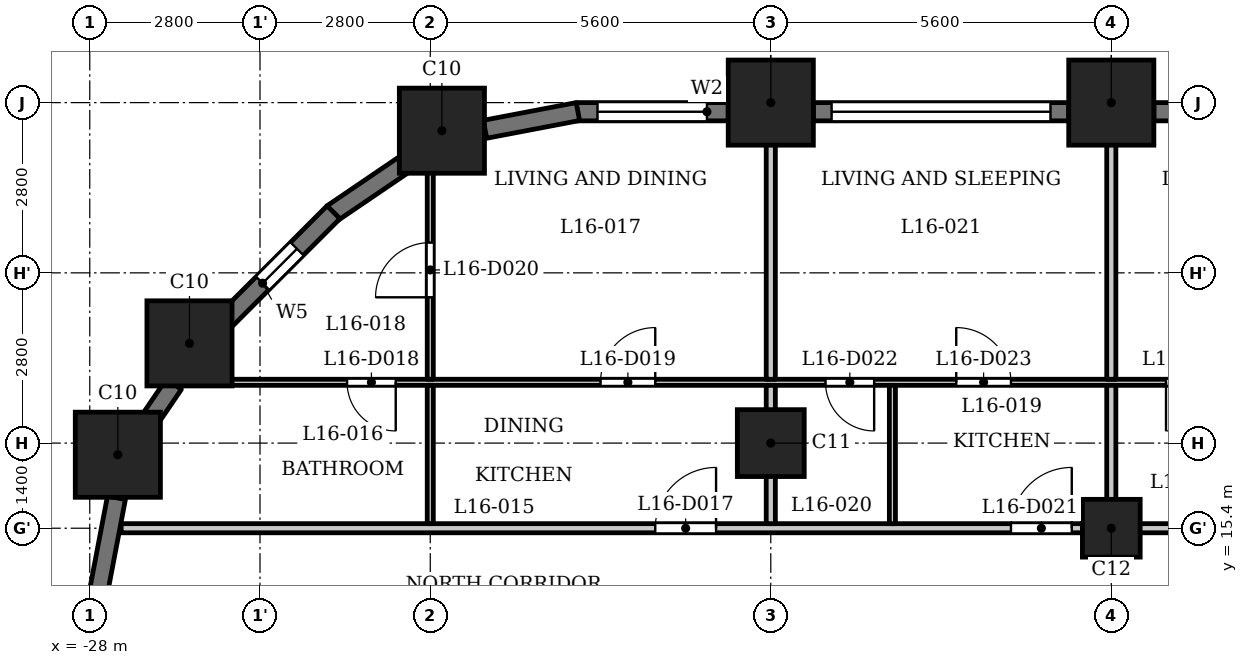
"""IFC4 building model, lengths in metres.
Left out: names, types, materials, properties, quantities, classifications, styles, units other than length and angle.
Written with IfcOpenShell. Run it as: python <this file> out.ifc"""

import sys

from ifc_helpers import new_model, si_unit, direction, frame, frame_2d, origin, origin_2d, place, context, subcontext, project, spatial, rectangle, extrude, element, fill, save


model = new_model("IFC4")
c1 = context("Model", 3, precision=1e-05, world=origin(), true_north=direction((0.0, 1.0)))
c2 = subcontext(c1, "Body", "Model", "MODEL_VIEW")
j1 = project(units=[si_unit("LENGTHUNIT", "METRE"), si_unit("PLANEANGLEUNIT", "RADIAN")], contexts=[c1])
p1 = place(None, origin())
s1 = spatial("IfcSite", under=j1, at=p1, CompositionType="ELEMENT")
p2 = place(p1, origin())
s2 = spatial("IfcBuilding", under=s1, at=p2, CompositionType="ELEMENT")
p3 = place(p2, frame((0.0, 0.0, 65.5)))
s3 = spatial("IfcBuildingStorey", under=s2, at=p3, CompositionType="ELEMENT", Elevation=65.5)
for number, where, z_axis, x_axis in (
    (1, (-11.2, 22.4, 0.0), (0.0, 0.0, 1.0), (1.0, 0.0, 0.0)),
    (2, (-16.8, 22.4, 0.0), (0.0, 0.0, 1.0), (1.0, 0.0, 0.0)),
    (3, (-22.209, 21.938, 0.0), (0.0, 0.0, 1.0), (1.0, 0.0, 0.0)),
    (4, (-26.36, 18.44, 0.0), (0.0, 0.0, 1.0), (1.0, 0.0, 0.0)),
    (5, (-27.538, 16.609, 0.0), (0.0, 0.0, 1.0), (1.0, 0.0, 0.0)),
):
    element("IfcColumn", number, at=place(p3, frame(where, z_axis=z_axis, x_axis=x_axis)), inside=s3, PredefinedType="COLUMN", context=c2, shape_type="SweptSolid", body=[
        extrude(rectangle(XDim=1.4, YDim=1.4, at=origin_2d()), origin(), (0.0, 0.0, 1.0), 3.5),
    ])
p4 = place(p3, frame((-16.8, 16.8, 0.0), z_axis=(0.0, 0.0, 1.0), x_axis=(1.0, 0.0, 0.0)))
e6 = element("IfcColumn", 6, at=p4, inside=s3, PredefinedType="COLUMN", context=c2, shape_type="SweptSolid", body=[
    extrude(rectangle(XDim=1.1, YDim=1.1, at=origin_2d()), origin(), (0.0, 0.0, 1.0), 3.5),
])
p5 = place(p3, frame((-11.2, 15.4, 0.0), z_axis=(0.0, 0.0, 1.0), x_axis=(1.0, 0.0, 0.0)))
e7 = element("IfcColumn", 7, at=p5, inside=s3, PredefinedType="COLUMN", context=c2, shape_type="SweptSolid", body=[
    extrude(rectangle(XDim=0.95, YDim=0.95, at=origin_2d()), origin(), (0.0, 0.0, 1.0), 3.5),
])
p6 = place(p3, frame((-6.3, 22.25, 0.0), z_axis=(0.0, 0.0, 1.0), x_axis=(-1.0, 0.0, 0.0)))
e8 = element("IfcWall", 8, at=p6, inside=s3, PredefinedType="SOLIDWALL", context=c2, shape_type="SweptSolid", body=[
    extrude(rectangle(XDim=4.2, YDim=0.3, at=frame_2d((2.1, 0.0))), origin(), (0.0, 0.0, 1.0), 2.35),
])
p7 = place(p6, frame((0.3, 0.0, 1.2)))
e9 = element("IfcOpeningElement", 9, at=p7, cuts=e8, PredefinedType="OPENING", context=c2, shape_type="SweptSolid", body=[
    extrude(rectangle(XDim=3.6, YDim=0.95, at=frame_2d((1.8, 0.475))), frame((0.0, 0.16, 0.0), z_axis=(0.0, -1.0, 0.0), x_axis=(1.0, 0.0, 0.0)), (0.0, 0.0, 1.0), 0.32),
])
p8 = place(p3, frame((-11.9, 22.25, 0.0), z_axis=(0.0, 0.0, 1.0), x_axis=(-1.0, 0.0, 0.0)))
e10 = element("IfcWall", 10, at=p8, inside=s3, PredefinedType="SOLIDWALL", context=c2, shape_type="SweptSolid", body=[
    extrude(rectangle(XDim=4.2, YDim=0.3, at=frame_2d((2.1, 0.0))), origin(), (0.0, 0.0, 1.0), 2.35),
])
p9 = place(p8, frame((0.3, 0.0, 1.2)))
e11 = element("IfcOpeningElement", 11, at=p9, cuts=e10, PredefinedType="OPENING", context=c2, shape_type="SweptSolid", body=[
    extrude(rectangle(XDim=3.6, YDim=0.95, at=frame_2d((1.8, 0.475))), frame((0.0, 0.16, 0.0), z_axis=(0.0, -1.0, 0.0), x_axis=(1.0, 0.0, 0.0)), (0.0, 0.0, 1.0), 0.32),
])
p10 = place(p3, frame((-17.5, 22.25, 0.0), z_axis=(0.0, 0.0, 1.0), x_axis=(-1.0, 0.0, 0.0)))
e12 = element("IfcWall", 12, at=p10, inside=s3, PredefinedType="SOLIDWALL", context=c2, shape_type="SweptSolid", body=[
    extrude(rectangle(XDim=2.5, YDim=0.3, at=frame_2d((1.25, 0.0))), origin(), (0.0, 0.0, 1.0), 2.35),
])
p11 = place(p10, frame((0.35, 0.0, 0.9)))
e13 = element("IfcOpeningElement", 13, at=p11, cuts=e12, PredefinedType="OPENING", context=c2, shape_type="SweptSolid", body=[
    extrude(rectangle(XDim=1.8, YDim=1.25, at=frame_2d((0.9, 0.625))), frame((0.0, 0.16, 0.0), z_axis=(0.0, -1.0, 0.0), x_axis=(1.0, 0.0, 0.0)), (0.0, 0.0, 1.0), 0.32),
])
p12 = place(p3, frame((-19.972, 22.253, 0.0), z_axis=(0.0, 0.0, 1.0), x_axis=(-0.982297345734, -0.187328386968, 0.0)))
e14 = element("IfcWall", 14, at=p12, inside=s3, PredefinedType="SOLIDWALL", context=c2, shape_type="SweptSolid", body=[
    extrude(rectangle(XDim=1.556, YDim=0.3, at=frame_2d((0.778, 0.0))), origin(), (0.0, 0.0, 1.0), 2.35),
])
p13 = place(p3, frame((-22.726, 21.454, 0.0), z_axis=(0.0, 0.0, 1.0), x_axis=(-0.827019875346, -0.562172683241, 0.0)))
e15 = element("IfcWall", 15, at=p13, inside=s3, PredefinedType="SOLIDWALL", context=c2, shape_type="SweptSolid", body=[
    extrude(rectangle(XDim=1.556, YDim=0.3, at=frame_2d((0.778, 0.0))), origin(), (0.0, 0.0, 1.0), 2.35),
])
p14 = place(p3, frame((-23.991, 20.597, 0.0), z_axis=(0.0, 0.0, 1.0), x_axis=(-0.707106781187, -0.707106781187, 0.0)))
e16 = element("IfcWall", 16, at=p14, inside=s3, PredefinedType="SOLIDWALL", context=c2, shape_type="SweptSolid", body=[
    extrude(rectangle(XDim=2.5, YDim=0.3, at=frame_2d((1.25, 0.0))), origin(), (0.0, 0.0, 1.0), 2.35),
])
p15 = place(p14, frame((0.85, 0.0, 0.6)))
e17 = element("IfcOpeningElement", 17, at=p15, cuts=e16, PredefinedType="OPENING", context=c2, shape_type="SweptSolid", body=[
    extrude(rectangle(XDim=0.8, YDim=1.55, at=frame_2d((0.4, 0.775))), frame((0.0, 0.16, 0.0), z_axis=(0.0, -1.0, 0.0), x_axis=(1.0, 0.0, 0.0)), (0.0, 0.0, 1.0), 0.32),
])
p16 = place(p3, frame((-26.617, 17.769, 0.0), z_axis=(0.0, 0.0, 1.0), x_axis=(-0.562000651531, -0.827136788977, 0.0)))
e18 = element("IfcWall", 18, at=p16, inside=s3, PredefinedType="SOLIDWALL", context=c2, shape_type="SweptSolid", body=[
    extrude(rectangle(XDim=0.777, YDim=0.3, at=frame_2d((0.389, 0.0))), origin(), (0.0, 0.0, 1.0), 3.2),
])
p17 = place(p3, frame((-27.561, 15.9, 0.0), z_axis=(0.0, 0.0, 1.0), x_axis=(-0.187328386968, -0.982297345734, 0.0)))
e19 = element("IfcWall", 19, at=p17, inside=s3, PredefinedType="SOLIDWALL", context=c2, shape_type="SweptSolid", body=[
    extrude(rectangle(XDim=1.556, YDim=0.3, at=frame_2d((0.778, 0.0))), origin(), (0.0, 0.0, 1.0), 2.35),
])
p18 = place(p3, frame((-27.484, 15.4, 0.0), z_axis=(0.0, 0.0, 1.0), x_axis=(1.0, 0.0, 0.0)))
e20 = element("IfcWall", 20, at=p18, inside=s3, PredefinedType="PARTITIONING", context=c2, shape_type="SweptSolid", body=[
    extrude(rectangle(XDim=54.968, YDim=0.15, at=frame_2d((27.484, 0.0))), origin(), (0.0, 0.0, 1.0), 3.2),
])
p19 = place(p18, frame((8.784, 0.0, 0.0)))
e21 = element("IfcOpeningElement", 21, at=p19, cuts=e20, PredefinedType="OPENING", context=c2, shape_type="SweptSolid", body=[
    extrude(rectangle(XDim=1.0, YDim=2.1, at=frame_2d((0.5, 1.05))), frame((0.0, 0.085, 0.0), z_axis=(0.0, -1.0, 0.0), x_axis=(1.0, 0.0, 0.0)), (0.0, 0.0, 1.0), 0.17),
])
p20 = place(p18, frame((14.634, 0.0, 0.0)))
e22 = element("IfcOpeningElement", 22, at=p20, cuts=e20, PredefinedType="OPENING", context=c2, shape_type="SweptSolid", body=[
    extrude(rectangle(XDim=1.0, YDim=2.1, at=frame_2d((0.5, 1.05))), frame((0.0, 0.085, 0.0), z_axis=(0.0, -1.0, 0.0), x_axis=(1.0, 0.0, 0.0)), (0.0, 0.0, 1.0), 0.17),
])
p21 = place(p18, frame((19.484, 0.0, 0.0)))
e23 = element("IfcOpeningElement", 23, at=p21, cuts=e20, PredefinedType="OPENING", context=c2, shape_type="SweptSolid", body=[
    extrude(rectangle(XDim=1.0, YDim=2.1, at=frame_2d((0.5, 1.05))), frame((0.0, 0.085, 0.0), z_axis=(0.0, -1.0, 0.0), x_axis=(1.0, 0.0, 0.0)), (0.0, 0.0, 1.0), 0.17),
])
p22 = place(p18, frame((23.634, 0.0, 0.0)))
e24 = element("IfcOpeningElement", 24, at=p22, cuts=e20, PredefinedType="OPENING", context=c2, shape_type="SweptSolid", body=[
    extrude(rectangle(XDim=1.0, YDim=2.1, at=frame_2d((0.5, 1.05))), frame((0.0, 0.085, 0.0), z_axis=(0.0, -1.0, 0.0), x_axis=(1.0, 0.0, 0.0)), (0.0, 0.0, 1.0), 0.17),
])
p23 = place(p18, frame((28.234, 0.0, 0.0)))
e25 = element("IfcOpeningElement", 25, at=p23, cuts=e20, PredefinedType="OPENING", context=c2, shape_type="SweptSolid", body=[
    extrude(rectangle(XDim=1.0, YDim=2.1, at=frame_2d((0.5, 1.05))), frame((0.0, 0.085, 0.0), z_axis=(0.0, -1.0, 0.0), x_axis=(1.0, 0.0, 0.0)), (0.0, 0.0, 1.0), 0.17),
])
p24 = place(p18, frame((33.784, 0.0, 0.0)))
e26 = element("IfcOpeningElement", 26, at=p24, cuts=e20, PredefinedType="OPENING", context=c2, shape_type="SweptSolid", body=[
    extrude(rectangle(XDim=1.0, YDim=2.1, at=frame_2d((0.5, 1.05))), frame((0.0, 0.085, 0.0), z_axis=(0.0, -1.0, 0.0), x_axis=(1.0, 0.0, 0.0)), (0.0, 0.0, 1.0), 0.17),
])
p25 = place(p18, frame((39.534, 0.0, 0.0)))
e27 = element("IfcOpeningElement", 27, at=p25, cuts=e20, PredefinedType="OPENING", context=c2, shape_type="SweptSolid", body=[
    extrude(rectangle(XDim=1.0, YDim=2.1, at=frame_2d((0.5, 1.05))), frame((0.0, 0.085, 0.0), z_axis=(0.0, -1.0, 0.0), x_axis=(1.0, 0.0, 0.0)), (0.0, 0.0, 1.0), 0.17),
])
p26 = place(p18, frame((48.234, 0.0, 0.0)))
e28 = element("IfcOpeningElement", 28, at=p26, cuts=e20, PredefinedType="OPENING", context=c2, shape_type="SweptSolid", body=[
    extrude(rectangle(XDim=1.0, YDim=2.1, at=frame_2d((0.5, 1.05))), frame((0.0, 0.085, 0.0), z_axis=(0.0, -1.0, 0.0), x_axis=(1.0, 0.0, 0.0)), (0.0, 0.0, 1.0), 0.17),
])
p27 = place(p3, frame((-26.64, 17.8, 0.0), z_axis=(0.0, 0.0, 1.0), x_axis=(1.0, 0.0, 0.0)))
e29 = element("IfcWall", 29, at=p27, inside=s3, PredefinedType="PARTITIONING", context=c2, shape_type="SweptSolid", body=[
    extrude(rectangle(XDim=53.034, YDim=0.1, at=frame_2d((26.517, 0.0))), origin(), (0.0, 0.0, 1.0), 3.2),
])
p28 = place(p27, frame((2.872, 0.0, 0.0)))
e30 = element("IfcOpeningElement", 30, at=p28, cuts=e29, PredefinedType="OPENING", context=c2, shape_type="SweptSolid", body=[
    extrude(rectangle(XDim=0.8, YDim=2.1, at=frame_2d((0.4, 1.05))), frame((0.0, 0.06, 0.0), z_axis=(0.0, -1.0, 0.0), x_axis=(1.0, 0.0, 0.0)), (0.0, 0.0, 1.0), 0.12),
])
p29 = place(p27, frame((7.04, 0.0, 0.0)))
e31 = element("IfcOpeningElement", 31, at=p29, cuts=e29, PredefinedType="OPENING", context=c2, shape_type="SweptSolid", body=[
    extrude(rectangle(XDim=0.9, YDim=2.1, at=frame_2d((0.45, 1.05))), frame((0.0, 0.06, 0.0), z_axis=(0.0, -1.0, 0.0), x_axis=(1.0, 0.0, 0.0)), (0.0, 0.0, 1.0), 0.12),
])
p30 = place(p27, frame((10.74, 0.0, 0.0)))
e32 = element("IfcOpeningElement", 32, at=p30, cuts=e29, PredefinedType="OPENING", context=c2, shape_type="SweptSolid", body=[
    extrude(rectangle(XDim=0.8, YDim=2.1, at=frame_2d((0.4, 1.05))), frame((0.0, 0.06, 0.0), z_axis=(0.0, -1.0, 0.0), x_axis=(1.0, 0.0, 0.0)), (0.0, 0.0, 1.0), 0.12),
])
p31 = place(p27, frame((12.89, 0.0, 0.0)))
e33 = element("IfcOpeningElement", 33, at=p31, cuts=e29, PredefinedType="OPENING", context=c2, shape_type="SweptSolid", body=[
    extrude(rectangle(XDim=0.9, YDim=2.1, at=frame_2d((0.45, 1.05))), frame((0.0, 0.06, 0.0), z_axis=(0.0, -1.0, 0.0), x_axis=(1.0, 0.0, 0.0)), (0.0, 0.0, 1.0), 0.12),
])
p32 = place(p27, frame((16.34, 0.0, 0.0)))
e34 = element("IfcOpeningElement", 34, at=p32, cuts=e29, PredefinedType="OPENING", context=c2, shape_type="SweptSolid", body=[
    extrude(rectangle(XDim=0.8, YDim=2.1, at=frame_2d((0.4, 1.05))), frame((0.0, 0.06, 0.0), z_axis=(0.0, -1.0, 0.0), x_axis=(1.0, 0.0, 0.0)), (0.0, 0.0, 1.0), 0.12),
])
p33 = place(p27, frame((19.74, 0.0, 0.0)))
e35 = element("IfcOpeningElement", 35, at=p33, cuts=e29, PredefinedType="OPENING", context=c2, shape_type="SweptSolid", body=[
    extrude(rectangle(XDim=0.9, YDim=2.1, at=frame_2d((0.45, 1.05))), frame((0.0, 0.06, 0.0), z_axis=(0.0, -1.0, 0.0), x_axis=(1.0, 0.0, 0.0)), (0.0, 0.0, 1.0), 0.12),
])
p34 = place(p27, frame((25.09, 0.0, 0.0)))
e36 = element("IfcOpeningElement", 36, at=p34, cuts=e29, PredefinedType="OPENING", context=c2, shape_type="SweptSolid", body=[
    extrude(rectangle(XDim=0.8, YDim=2.1, at=frame_2d((0.4, 1.05))), frame((0.0, 0.06, 0.0), z_axis=(0.0, -1.0, 0.0), x_axis=(1.0, 0.0, 0.0)), (0.0, 0.0, 1.0), 0.12),
])
p35 = place(p27, frame((21.89, 0.0, 0.0)))
e37 = element("IfcOpeningElement", 37, at=p35, cuts=e29, PredefinedType="OPENING", context=c2, shape_type="SweptSolid", body=[
    extrude(rectangle(XDim=0.9, YDim=2.1, at=frame_2d((0.45, 1.05))), frame((0.0, 0.06, 0.0), z_axis=(0.0, -1.0, 0.0), x_axis=(1.0, 0.0, 0.0)), (0.0, 0.0, 1.0), 0.12),
])
p36 = place(p27, frame((30.69, 0.0, 0.0)))
e38 = element("IfcOpeningElement", 38, at=p36, cuts=e29, PredefinedType="OPENING", context=c2, shape_type="SweptSolid", body=[
    extrude(rectangle(XDim=0.8, YDim=2.1, at=frame_2d((0.4, 1.05))), frame((0.0, 0.06, 0.0), z_axis=(0.0, -1.0, 0.0), x_axis=(1.0, 0.0, 0.0)), (0.0, 0.0, 1.0), 0.12),
])
p37 = place(p27, frame((28.49, 0.0, 0.0)))
e39 = element("IfcOpeningElement", 39, at=p37, cuts=e29, PredefinedType="OPENING", context=c2, shape_type="SweptSolid", body=[
    extrude(rectangle(XDim=0.9, YDim=2.1, at=frame_2d((0.45, 1.05))), frame((0.0, 0.06, 0.0), z_axis=(0.0, -1.0, 0.0), x_axis=(1.0, 0.0, 0.0)), (0.0, 0.0, 1.0), 0.12),
])
p38 = place(p27, frame((36.49, 0.0, 0.0)))
e40 = element("IfcOpeningElement", 40, at=p38, cuts=e29, PredefinedType="OPENING", context=c2, shape_type="SweptSolid", body=[
    extrude(rectangle(XDim=0.8, YDim=2.1, at=frame_2d((0.4, 1.05))), frame((0.0, 0.06, 0.0), z_axis=(0.0, -1.0, 0.0), x_axis=(1.0, 0.0, 0.0)), (0.0, 0.0, 1.0), 0.12),
])
p39 = place(p27, frame((33.04, 0.0, 0.0)))
e41 = element("IfcOpeningElement", 41, at=p39, cuts=e29, PredefinedType="OPENING", context=c2, shape_type="SweptSolid", body=[
    extrude(rectangle(XDim=0.9, YDim=2.1, at=frame_2d((0.45, 1.05))), frame((0.0, 0.06, 0.0), z_axis=(0.0, -1.0, 0.0), x_axis=(1.0, 0.0, 0.0)), (0.0, 0.0, 1.0), 0.12),
])
p40 = place(p27, frame((41.49, 0.0, 0.0)))
e42 = element("IfcOpeningElement", 42, at=p40, cuts=e29, PredefinedType="OPENING", context=c2, shape_type="SweptSolid", body=[
    extrude(rectangle(XDim=0.8, YDim=2.1, at=frame_2d((0.4, 1.05))), frame((0.0, 0.06, 0.0), z_axis=(0.0, -1.0, 0.0), x_axis=(1.0, 0.0, 0.0)), (0.0, 0.0, 1.0), 0.12),
])
p41 = place(p27, frame((39.79, 0.0, 0.0)))
e43 = element("IfcOpeningElement", 43, at=p41, cuts=e29, PredefinedType="OPENING", context=c2, shape_type="SweptSolid", body=[
    extrude(rectangle(XDim=0.9, YDim=2.1, at=frame_2d((0.45, 1.05))), frame((0.0, 0.06, 0.0), z_axis=(0.0, -1.0, 0.0), x_axis=(1.0, 0.0, 0.0)), (0.0, 0.0, 1.0), 0.12),
])
p42 = place(p27, frame((51.44, 0.0, 0.0)))
e44 = element("IfcOpeningElement", 44, at=p42, cuts=e29, PredefinedType="OPENING", context=c2, shape_type="SweptSolid", body=[
    extrude(rectangle(XDim=0.8, YDim=2.1, at=frame_2d((0.4, 1.05))), frame((0.0, 0.06, 0.0), z_axis=(0.0, -1.0, 0.0), x_axis=(1.0, 0.0, 0.0)), (0.0, 0.0, 1.0), 0.12),
])
p43 = place(p27, frame((46.49, 0.0, 0.0)))
e45 = element("IfcOpeningElement", 45, at=p43, cuts=e29, PredefinedType="OPENING", context=c2, shape_type="SweptSolid", body=[
    extrude(rectangle(XDim=0.9, YDim=2.1, at=frame_2d((0.45, 1.05))), frame((0.0, 0.06, 0.0), z_axis=(0.0, -1.0, 0.0), x_axis=(1.0, 0.0, 0.0)), (0.0, 0.0, 1.0), 0.12),
])
p44 = place(p3, frame((-22.4, 15.475, 0.0), z_axis=(0.0, 0.0, 1.0), x_axis=(0.0, 1.0, 0.0)))
e46 = element("IfcWall", 46, at=p44, inside=s3, PredefinedType="PARTITIONING", context=c2, shape_type="SweptSolid", body=[
    extrude(rectangle(XDim=2.275, YDim=0.1, at=frame_2d((1.137, 0.0))), origin(), (0.0, 0.0, 1.0), 3.2),
])
p45 = place(p3, frame((-22.4, 17.85, 0.0), z_axis=(0.0, 0.0, 1.0), x_axis=(0.0, 1.0, 0.0)))
e47 = element("IfcWall", 47, at=p45, inside=s3, PredefinedType="PARTITIONING", context=c2, shape_type="SweptSolid", body=[
    extrude(rectangle(XDim=3.87, YDim=0.1, at=frame_2d((1.935, 0.0))), origin(), (0.0, 0.0, 1.0), 3.2),
])
p46 = place(p45, frame((1.348, 0.0, 0.0)))
e48 = element("IfcOpeningElement", 48, at=p46, cuts=e47, PredefinedType="OPENING", context=c2, shape_type="SweptSolid", body=[
    extrude(rectangle(XDim=0.9, YDim=2.1, at=frame_2d((0.45, 1.05))), frame((0.0, 0.06, 0.0), z_axis=(0.0, -1.0, 0.0), x_axis=(1.0, 0.0, 0.0)), (0.0, 0.0, 1.0), 0.12),
])
p47 = place(p3, frame((-16.8, 15.475, 0.0), z_axis=(0.0, 0.0, 1.0), x_axis=(0.0, 1.0, 0.0)))
e49 = element("IfcWall", 49, at=p47, inside=s3, PredefinedType="PARTITIONING", context=c2, shape_type="SweptSolid", body=[
    extrude(rectangle(XDim=2.275, YDim=0.15, at=frame_2d((1.137, 0.0))), origin(), (0.0, 0.0, 1.0), 3.2),
])
p48 = place(p3, frame((-16.8, 17.85, 0.0), z_axis=(0.0, 0.0, 1.0), x_axis=(0.0, 1.0, 0.0)))
e50 = element("IfcWall", 50, at=p48, inside=s3, PredefinedType="PARTITIONING", context=c2, shape_type="SweptSolid", body=[
    extrude(rectangle(XDim=5.23, YDim=0.15, at=frame_2d((2.615, 0.0))), origin(), (0.0, 0.0, 1.0), 3.2),
])
p49 = place(p3, frame((-14.8, 15.475, 0.0), z_axis=(0.0, 0.0, 1.0), x_axis=(0.0, 1.0, 0.0)))
e51 = element("IfcWall", 51, at=p49, inside=s3, PredefinedType="PARTITIONING", context=c2, shape_type="SweptSolid", body=[
    extrude(rectangle(XDim=2.275, YDim=0.1, at=frame_2d((1.137, 0.0))), origin(), (0.0, 0.0, 1.0), 3.2),
])
p50 = place(p3, frame((-11.2, 15.475, 0.0), z_axis=(0.0, 0.0, 1.0), x_axis=(0.0, 1.0, 0.0)))
e52 = element("IfcWall", 52, at=p50, inside=s3, PredefinedType="PARTITIONING", context=c2, shape_type="SweptSolid", body=[
    extrude(rectangle(XDim=2.275, YDim=0.15, at=frame_2d((1.137, 0.0))), origin(), (0.0, 0.0, 1.0), 3.2),
])
p51 = place(p3, frame((-11.2, 17.85, 0.0), z_axis=(0.0, 0.0, 1.0), x_axis=(0.0, 1.0, 0.0)))
e53 = element("IfcWall", 53, at=p51, inside=s3, PredefinedType="PARTITIONING", context=c2, shape_type="SweptSolid", body=[
    extrude(rectangle(XDim=5.23, YDim=0.15, at=frame_2d((2.615, 0.0))), origin(), (0.0, 0.0, 1.0), 3.2),
])
p52 = place(p19, origin())
e54 = element("IfcDoor", 54, at=p52, inside=s3, OperationType="SINGLE_SWING_LEFT", PredefinedType="DOOR", context=c2, shape_type="SweptSolid", body=[
    extrude(rectangle(XDim=1.0, YDim=2.1, at=frame_2d((0.5, 1.05))), frame((0.0, 0.025, 0.0), z_axis=(0.0, -1.0, 0.0), x_axis=(1.0, 0.0, 0.0)), (0.0, 0.0, 1.0), 0.05),
])
fill(e21, e54)
p53 = place(p28, origin())
e55 = element("IfcDoor", 55, at=p53, inside=s3, OperationType="SINGLE_SWING_RIGHT", PredefinedType="DOOR", context=c2, shape_type="SweptSolid", body=[
    extrude(rectangle(XDim=0.8, YDim=2.1, at=frame_2d((0.4, 1.05))), frame((0.0, 0.025, 0.0), z_axis=(0.0, -1.0, 0.0), x_axis=(1.0, 0.0, 0.0)), (0.0, 0.0, 1.0), 0.05),
])
fill(e30, e55)
p54 = place(p29, origin())
e56 = element("IfcDoor", 56, at=p54, inside=s3, OperationType="SINGLE_SWING_LEFT", PredefinedType="DOOR", context=c2, shape_type="SweptSolid", body=[
    extrude(rectangle(XDim=0.9, YDim=2.1, at=frame_2d((0.45, 1.05))), frame((0.0, 0.025, 0.0), z_axis=(0.0, -1.0, 0.0), x_axis=(1.0, 0.0, 0.0)), (0.0, 0.0, 1.0), 0.05),
])
fill(e31, e56)
p55 = place(p46, origin())
e57 = element("IfcDoor", 57, at=p55, inside=s3, OperationType="SINGLE_SWING_RIGHT", PredefinedType="DOOR", context=c2, shape_type="SweptSolid", body=[
    extrude(rectangle(XDim=0.9, YDim=2.1, at=frame_2d((0.45, 1.05))), frame((0.0, 0.025, 0.0), z_axis=(0.0, -1.0, 0.0), x_axis=(1.0, 0.0, 0.0)), (0.0, 0.0, 1.0), 0.05),
])
fill(e48, e57)
p56 = place(p20, origin())
e58 = element("IfcDoor", 58, at=p56, inside=s3, OperationType="SINGLE_SWING_LEFT", PredefinedType="DOOR", context=c2, shape_type="SweptSolid", body=[
    extrude(rectangle(XDim=1.0, YDim=2.1, at=frame_2d((0.5, 1.05))), frame((0.0, 0.025, 0.0), z_axis=(0.0, -1.0, 0.0), x_axis=(1.0, 0.0, 0.0)), (0.0, 0.0, 1.0), 0.05),
])
fill(e22, e58)
p57 = place(p30, origin())
e59 = element("IfcDoor", 59, at=p57, inside=s3, OperationType="SINGLE_SWING_RIGHT", PredefinedType="DOOR", context=c2, shape_type="SweptSolid", body=[
    extrude(rectangle(XDim=0.8, YDim=2.1, at=frame_2d((0.4, 1.05))), frame((0.0, 0.025, 0.0), z_axis=(0.0, -1.0, 0.0), x_axis=(1.0, 0.0, 0.0)), (0.0, 0.0, 1.0), 0.05),
])
fill(e32, e59)
p58 = place(p31, origin())
e60 = element("IfcDoor", 60, at=p58, inside=s3, OperationType="SINGLE_SWING_RIGHT", PredefinedType="DOOR", context=c2, shape_type="SweptSolid", body=[
    extrude(rectangle(XDim=0.9, YDim=2.1, at=frame_2d((0.45, 1.05))), frame((0.0, 0.025, 0.0), z_axis=(0.0, -1.0, 0.0), x_axis=(1.0, 0.0, 0.0)), (0.0, 0.0, 1.0), 0.05),
])
fill(e33, e60)
p59 = place(p32, origin())
e61 = element("IfcDoor", 61, at=p59, inside=s3, OperationType="SINGLE_SWING_LEFT", PredefinedType="DOOR", context=c2, shape_type="SweptSolid", body=[
    extrude(rectangle(XDim=0.8, YDim=2.1, at=frame_2d((0.4, 1.05))), frame((0.0, 0.025, 0.0), z_axis=(0.0, -1.0, 0.0), x_axis=(1.0, 0.0, 0.0)), (0.0, 0.0, 1.0), 0.05),
])
fill(e34, e61)
p60 = place(p9, origin())
e62 = element("IfcWindow", 62, at=p60, inside=s3, PartitioningType="SINGLE_PANEL", PredefinedType="WINDOW", context=c2, shape_type="SweptSolid", body=[
    extrude(rectangle(XDim=3.6, YDim=0.95, at=frame_2d((1.8, 0.475))), frame((0.0, 0.03, 0.0), z_axis=(0.0, -1.0, 0.0), x_axis=(1.0, 0.0, 0.0)), (0.0, 0.0, 1.0), 0.06),
])
fill(e11, e62)
p61 = place(p11, origin())
e63 = element("IfcWindow", 63, at=p61, inside=s3, PartitioningType="SINGLE_PANEL", PredefinedType="WINDOW", context=c2, shape_type="SweptSolid", body=[
    extrude(rectangle(XDim=1.8, YDim=1.25, at=frame_2d((0.9, 0.625))), frame((0.0, 0.03, 0.0), z_axis=(0.0, -1.0, 0.0), x_axis=(1.0, 0.0, 0.0)), (0.0, 0.0, 1.0), 0.06),
])
fill(e13, e63)
p62 = place(p15, origin())
e64 = element("IfcWindow", 64, at=p62, inside=s3, PartitioningType="SINGLE_PANEL", PredefinedType="WINDOW", context=c2, shape_type="SweptSolid", body=[
    extrude(rectangle(XDim=0.8, YDim=1.55, at=frame_2d((0.4, 0.775))), frame((0.0, 0.03, 0.0), z_axis=(0.0, -1.0, 0.0), x_axis=(1.0, 0.0, 0.0)), (0.0, 0.0, 1.0), 0.06),
])
fill(e17, e64)
save(model, sys.argv[1])
